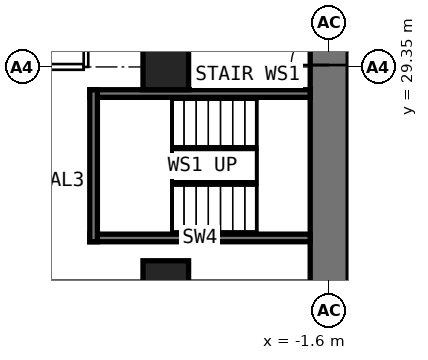
"""IFC4 building model, lengths in metres.
Left out: names, types, materials, properties, quantities, classifications, styles, units other than length and angle.
Written with IfcOpenShell. Run it as: python <this file> out.ifc"""

import sys

from ifc_helpers import new_model, si_unit, direction, frame, frame_2d, origin, origin_2d, place, context, subcontext, project, spatial, rectangle, extrude, element, fill, save


model = new_model("IFC4")
c1 = context("Model", 3, precision=1e-05, world=origin(), true_north=direction((0.0, 1.0)))
c2 = subcontext(c1, "Body", "Model", "MODEL_VIEW")
j1 = project(units=[si_unit("LENGTHUNIT", "METRE"), si_unit("PLANEANGLEUNIT", "RADIAN")], contexts=[c1])
p1 = place(None, origin())
s1 = spatial("IfcSite", under=j1, at=p1, CompositionType="ELEMENT")
p2 = place(p1, origin())
s2 = spatial("IfcBuilding", under=s1, at=p2, CompositionType="ELEMENT")
p3 = place(p2, frame((0.0, 0.0, 10.8)))
s3 = spatial("IfcBuildingStorey", under=s2, at=p3, CompositionType="ELEMENT", Elevation=10.8)
for number, where, z_axis, x_axis in (
    (1, (-5.9, 23.65, 0.0), (0.0, 0.0, 1.0), (0.0, 1.0, 0.0)),
    (2, (-5.9, 29.35, 0.0), (0.0, 0.0, 1.0), (0.0, 1.0, 0.0)),
):
    element("IfcColumn", number, at=place(p3, frame(where, z_axis=z_axis, x_axis=x_axis)), inside=s3, PredefinedType="COLUMN", context=c2, shape_type="SweptSolid", body=[
        extrude(rectangle(XDim=1.2, YDim=1.2, at=origin_2d()), origin(), (0.0, 0.0, 1.0), 4.8),
    ])
p4 = place(p3, frame((-1.6, 23.65, 0.0), z_axis=(0.0, 0.0, 1.0), x_axis=(0.0, 1.0, 0.0)))
e3 = element("IfcWall", 3, at=p4, inside=s3, PredefinedType="SHEAR", context=c2, shape_type="SweptSolid", body=[
    extrude(rectangle(XDim=10.745, YDim=1.0, at=frame_2d((5.373, 0.0))), origin(), (0.0, 0.0, 1.0), 4.8),
])
p5 = place(p4, frame((5.75, 0.0, 0.0)))
e4 = element("IfcOpeningElement", 4, at=p5, cuts=e3, PredefinedType="OPENING", context=c2, shape_type="SweptSolid", body=[
    extrude(rectangle(XDim=1.0, YDim=2.3, at=frame_2d((0.5, 1.15))), frame((0.0, 0.512, 0.0), z_axis=(0.0, -1.0, 0.0), x_axis=(1.0, 0.0, 0.0)), (0.0, 0.0, 1.0), 1.024),
])
p6 = place(p4, frame((8.86, 0.0, 0.0)))
e5 = element("IfcOpeningElement", 5, at=p6, cuts=e3, PredefinedType="OPENING", context=c2, shape_type="SweptSolid", body=[
    extrude(rectangle(XDim=1.0, YDim=2.3, at=frame_2d((0.5, 1.15))), frame((0.0, 0.512, 0.0), z_axis=(0.0, -1.0, 0.0), x_axis=(1.0, 0.0, 0.0)), (0.0, 0.0, 1.0), 1.024),
])
p7 = place(p3, frame((-8.06, 29.35, 0.0), z_axis=(0.0, 0.0, 1.0), x_axis=(-1.0, 0.0, 0.0)))
e6 = element("IfcWall", 6, at=p7, inside=s3, PredefinedType="PARTITIONING", context=c2, shape_type="SweptSolid", body=[
    extrude(rectangle(XDim=2.64, YDim=0.15, at=frame_2d((1.32, 0.0))), origin(), (0.0, 0.0, 1.0), 3.5),
])
p8 = place(p3, frame((-8.0, 29.35, 0.0), z_axis=(0.0, 0.0, 1.0), x_axis=(0.0, 1.0, 0.0)))
e7 = element("IfcWall", 7, at=p8, inside=s3, PredefinedType="PARTITIONING", context=c2, shape_type="SweptSolid", body=[
    extrude(rectangle(XDim=2.1, YDim=0.12, at=frame_2d((1.05, 0.0))), origin(), (0.0, 0.0, 1.0), 4.5),
])
for number, where, z_axis, x_axis in (
    (8, (-2.1, 24.85, 0.0), (0.0, 0.0, 1.0), (-1.0, 0.0, 0.0)),
    (9, (-2.1, 28.65, 0.0), (0.0, 0.0, 1.0), (-1.0, 0.0, 0.0)),
):
    element("IfcWall", number, at=place(p3, frame(where, z_axis=z_axis, x_axis=x_axis)), inside=s3, PredefinedType="SHEAR", context=c2, shape_type="SweptSolid", body=[
        extrude(rectangle(XDim=5.8, YDim=0.2, at=frame_2d((2.9, 0.0))), origin(), (0.0, 0.0, 1.0), 4.48),
    ])
p9 = place(p3, frame((-7.8, 24.75, 0.0), z_axis=(0.0, 0.0, 1.0), x_axis=(0.0, 1.0, 0.0)))
e10 = element("IfcWall", 10, at=p9, inside=s3, PredefinedType="SHEAR", context=c2, shape_type="SweptSolid", body=[
    extrude(rectangle(XDim=4.0, YDim=0.2, at=frame_2d((2.0, 0.0))), origin(), (0.0, 0.0, 1.0), 4.48),
])
p10 = place(p5, origin())
e11 = element("IfcDoor", 11, at=p10, inside=s3, OperationType="SINGLE_SWING_LEFT", PredefinedType="DOOR", context=c2, shape_type="SweptSolid", body=[
    extrude(rectangle(XDim=1.0, YDim=2.3, at=frame_2d((0.5, 1.15))), frame((0.0, 0.25, 0.0), z_axis=(0.0, -1.0, 0.0), x_axis=(1.0, 0.0, 0.0)), (0.0, 0.0, 1.0), 0.5),
])
fill(e4, e11)
save(model, sys.argv[1])
